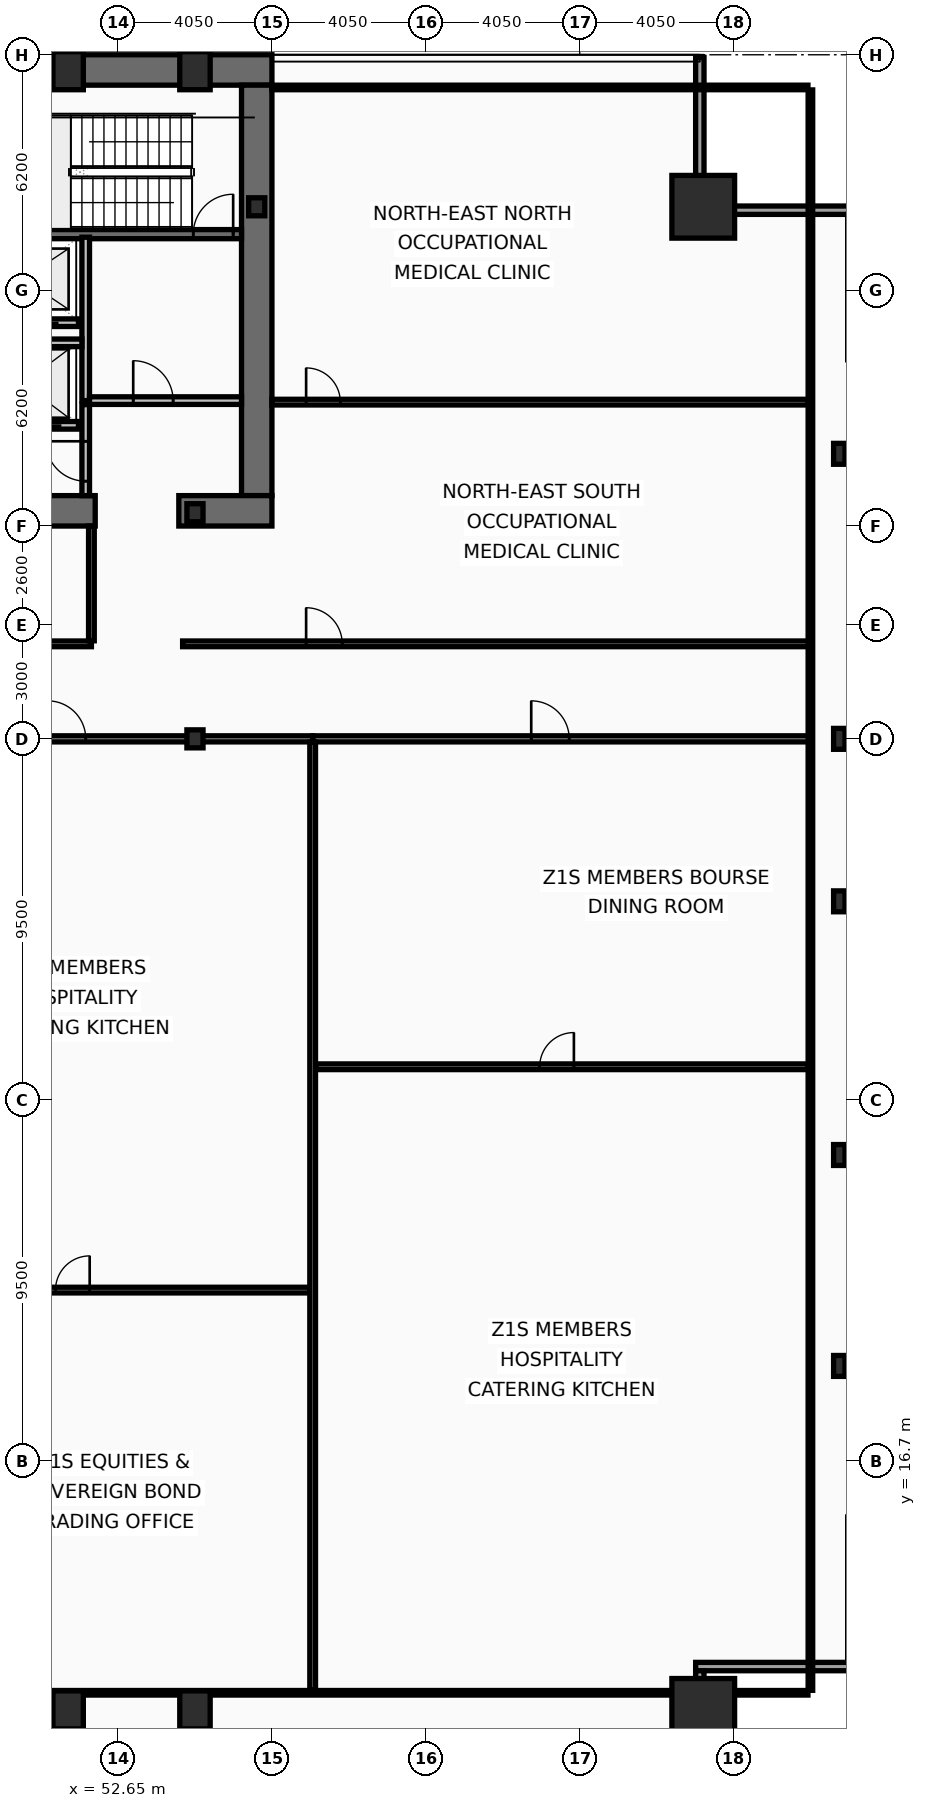
"""IFC4 building model, lengths in metres.
Left out: names, types, materials, properties, quantities, classifications, styles, units other than length and angle.
Written with IfcOpenShell. Run it as: python <this file> out.ifc"""

import sys

from ifc_helpers import new_model, si_unit, direction, frame, frame_2d, origin, origin_2d, place, context, subcontext, project, spatial, rectangle, hollow_rectangle, i_section, extrude, element, fill, save


model = new_model("IFC4")
c1 = context("Model", 3, precision=1e-05, world=origin(), true_north=direction((0.0, 1.0)))
c2 = subcontext(c1, "Body", "Model", "MODEL_VIEW")
j1 = project(units=[si_unit("LENGTHUNIT", "METRE"), si_unit("PLANEANGLEUNIT", "RADIAN")], contexts=[c1])
p1 = place(None, origin())
s1 = spatial("IfcSite", under=j1, at=p1, CompositionType="ELEMENT")
p2 = place(p1, origin())
s2 = spatial("IfcBuilding", under=s1, at=p2, CompositionType="ELEMENT")
p3 = place(p2, frame((0.0, 0.0, 37.8)))
s3 = spatial("IfcBuildingStorey", under=s2, at=p3, CompositionType="ELEMENT", Elevation=37.8)
p4 = place(p3, frame((16.2, 53.3, 0.0), z_axis=(0.0, 0.0, 1.0), x_axis=(1.0, 0.0, 0.0)))
e1 = element("IfcWall", 1, at=p4, inside=s3, PredefinedType="SHEAR", context=c2, shape_type="SweptSolid", body=[
    extrude(rectangle(XDim=40.5, YDim=0.8, at=frame_2d((20.25, 0.0))), origin(), (0.0, 0.0, 1.0), 3.82),
])
p5 = place(p3, frame((56.3, 52.9, 0.0), z_axis=(0.0, 0.0, 1.0), x_axis=(0.0, -1.0, 0.0)))
e2 = element("IfcWall", 2, at=p5, inside=s3, PredefinedType="SHEAR", context=c2, shape_type="SweptSolid", body=[
    extrude(rectangle(XDim=10.8, YDim=0.8, at=frame_2d((5.4, 0.0))), origin(), (0.0, 0.0, 1.0), 3.82),
])
p6 = place(p3, frame((52.05, 41.7, 0.0), z_axis=(0.0, 0.0, 1.0), x_axis=(-1.0, 0.0, 0.0)))
e3 = element("IfcWall", 3, at=p6, inside=s3, PredefinedType="SHEAR", context=c2, shape_type="SweptSolid", body=[
    extrude(rectangle(XDim=11.3, YDim=0.8, at=frame_2d((5.65, 0.0))), origin(), (0.0, 0.0, 1.0), 3.82),
])
p7 = place(p3, frame((56.7, 41.7, 0.0), z_axis=(0.0, 0.0, 1.0), x_axis=(-1.0, 0.0, 0.0)))
e4 = element("IfcWall", 4, at=p7, inside=s3, PredefinedType="SHEAR", context=c2, shape_type="SweptSolid", body=[
    extrude(rectangle(XDim=2.45, YDim=0.8, at=frame_2d((1.225, 0.0))), origin(), (0.0, 0.0, 1.0), 3.82),
])
p8 = place(p3, frame((48.63, 48.98, 0.0), z_axis=(0.0, 0.0, 1.0), x_axis=(1.0, 0.0, 0.0)))
e5 = element("IfcWall", 5, at=p8, inside=s3, PredefinedType="SHEAR", context=c2, shape_type="SweptSolid", body=[
    extrude(rectangle(XDim=7.27, YDim=0.24, at=frame_2d((3.635, 0.0))), origin(), (0.0, 0.0, 1.0), 3.82),
])
p9 = place(p8, frame((6.0, 0.0, 0.0)))
e6 = element("IfcOpeningElement", 6, at=p9, cuts=e5, PredefinedType="OPENING", context=c2, shape_type="SweptSolid", body=[
    extrude(rectangle(XDim=1.05, YDim=2.15, at=frame_2d((0.525, 1.075))), frame((0.0, 0.13, 0.0), z_axis=(0.0, -1.0, 0.0), x_axis=(1.0, 0.0, 0.0)), (0.0, 0.0, 1.0), 0.26),
])
for number, where, z_axis, x_axis in (
    (7, (68.05, 10.15, 0.0), (0.0, 0.0, 1.0), (1.0, 0.0, 0.0)),
    (8, (68.05, 49.7, 0.0), (0.0, 0.0, 1.0), (1.0, 0.0, 0.0)),
):
    element("IfcColumn", number, at=place(p3, frame(where, z_axis=z_axis, x_axis=x_axis)), inside=s3, PredefinedType="COLUMN", context=c2, shape_type="SweptSolid", body=[
        extrude(hollow_rectangle(XDim=1.65, YDim=1.65, WallThickness=0.075, at=origin_2d()), origin(), (0.0, 0.0, 1.0), 4.0),
    ])
for number, where, z_axis, x_axis in (
    (9, (51.337, 10.15, 0.0), (0.0, 0.0, 1.0), (1.0, 0.0, 0.0)),
    (10, (54.675, 10.15, 0.0), (0.0, 0.0, 1.0), (1.0, 0.0, 0.0)),
    (11, (51.337, 53.28, 0.0), (0.0, 0.0, 1.0), (1.0, 0.0, 0.0)),
    (12, (54.675, 53.28, 0.0), (0.0, 0.0, 1.0), (1.0, 0.0, 0.0)),
):
    element("IfcColumn", number, at=place(p3, frame(where, z_axis=z_axis, x_axis=x_axis)), inside=s3, PredefinedType="COLUMN", context=c2, shape_type="SweptSolid", body=[
        extrude(hollow_rectangle(XDim=0.8, YDim=1.0, WallThickness=0.055, at=origin_2d()), origin(), (0.0, 0.0, 1.0), 4.0),
    ])
for number, where, z_axis, x_axis in (
    (13, (71.63, 19.2, 0.0), (0.0, 0.0, 1.0), (1.0, 0.0, 0.0)),
    (14, (71.63, 24.75, 0.0), (0.0, 0.0, 1.0), (1.0, 0.0, 0.0)),
    (15, (71.63, 31.425, 0.0), (0.0, 0.0, 1.0), (1.0, 0.0, 0.0)),
    (16, (71.63, 35.7, 0.0), (0.0, 0.0, 1.0), (1.0, 0.0, 0.0)),
    (17, (71.63, 43.2, 0.0), (0.0, 0.0, 1.0), (1.0, 0.0, 0.0)),
):
    element("IfcColumn", number, at=place(p3, frame(where, z_axis=z_axis, x_axis=x_axis)), inside=s3, PredefinedType="COLUMN", context=c2, shape_type="SweptSolid", body=[
        extrude(i_section(OverallWidth=0.3, OverallDepth=0.55, WebThickness=0.015, FlangeThickness=0.029, at=origin_2d()), origin(), (0.0, 0.0, 1.0), 4.0),
    ])
for number, where, z_axis, x_axis in (
    (18, (56.3, 49.7, 0.0), (0.0, 0.0, 1.0), (1.0, 0.0, 0.0)),
    (19, (54.675, 35.7, 0.0), (0.0, 0.0, 1.0), (1.0, 0.0, 0.0)),
    (20, (54.675, 41.65, 0.0), (0.0, 0.0, 1.0), (1.0, 0.0, 0.0)),
):
    element("IfcColumn", number, at=place(p3, frame(where, z_axis=z_axis, x_axis=x_axis)), inside=s3, PredefinedType="COLUMN", context=c2, shape_type="SweptSolid", body=[
        extrude(i_section(OverallWidth=0.424, OverallDepth=0.474, WebThickness=0.048, FlangeThickness=0.077, at=origin_2d()), origin(), (0.0, 0.0, 1.0), 4.0),
    ])
p10 = place(p3, frame((67.96, 53.63, 0.0), z_axis=(0.0, 0.0, 1.0), x_axis=(0.0, -1.0, 0.0)))
e21 = element("IfcWall", 21, at=p10, inside=s3, PredefinedType="SOLIDWALL", context=c2, shape_type="SweptSolid", body=[
    extrude(rectangle(XDim=3.91, YDim=0.22, at=frame_2d((1.955, 0.0))), origin(), (0.0, 0.0, 1.0), 3.16),
])
for number, where, z_axis, x_axis in (
    (22, (67.85, 49.61, 0.0), (0.0, 0.0, 1.0), (1.0, 0.0, 0.0)),
    (23, (72.07, 11.29, 0.0), (0.0, 0.0, 1.0), (-1.0, 0.0, 0.0)),
):
    element("IfcWall", number, at=place(p3, frame(where, z_axis=z_axis, x_axis=x_axis)), inside=s3, PredefinedType="SOLIDWALL", context=c2, shape_type="SweptSolid", body=[
        extrude(rectangle(XDim=4.22, YDim=0.22, at=frame_2d((2.11, 0.0))), origin(), (0.0, 0.0, 1.0), 3.16),
    ])
p11 = place(p3, frame((67.96, 11.18, 0.0), z_axis=(0.0, 0.0, 1.0), x_axis=(0.0, -1.0, 0.0)))
e24 = element("IfcWall", 24, at=p11, inside=s3, PredefinedType="SOLIDWALL", context=c2, shape_type="SweptSolid", body=[
    extrude(rectangle(XDim=3.91, YDim=0.22, at=frame_2d((1.955, 0.0))), origin(), (0.0, 0.0, 1.0), 3.16),
])
p12 = place(p3, frame((51.61, 43.95, 0.0), z_axis=(0.0, 0.0, 1.0), x_axis=(-1.0, 0.0, 0.0)))
e25 = element("IfcWall", 25, at=p12, inside=s3, PredefinedType="PARTITIONING", context=c2, shape_type="SweptSolid", body=[
    extrude(rectangle(XDim=2.92, YDim=0.2, at=frame_2d((1.46, 0.0))), origin(), (0.0, 0.0, 1.0), 3.82),
])
p13 = place(p12, frame((0.81, 0.0, 0.0)))
e26 = element("IfcOpeningElement", 26, at=p13, cuts=e25, PredefinedType="OPENING", context=c2, shape_type="SweptSolid", body=[
    extrude(rectangle(XDim=1.3, YDim=2.18, at=frame_2d((0.65, 1.09))), frame((0.0, 0.11, 0.0), z_axis=(0.0, -1.0, 0.0), x_axis=(1.0, 0.0, 0.0)), (0.0, 0.0, 1.0), 0.22),
])
p14 = place(p3, frame((51.61, 46.65, 0.0), z_axis=(0.0, 0.0, 1.0), x_axis=(-1.0, 0.0, 0.0)))
e27 = element("IfcWall", 27, at=p14, inside=s3, PredefinedType="PARTITIONING", context=c2, shape_type="SweptSolid", body=[
    extrude(rectangle(XDim=2.92, YDim=0.2, at=frame_2d((1.46, 0.0))), origin(), (0.0, 0.0, 1.0), 3.82),
])
p15 = place(p14, frame((0.86, 0.0, 0.0)))
e28 = element("IfcOpeningElement", 28, at=p15, cuts=e27, PredefinedType="OPENING", context=c2, shape_type="SweptSolid", body=[
    extrude(rectangle(XDim=1.2, YDim=2.18, at=frame_2d((0.6, 1.09))), frame((0.0, 0.11, 0.0), z_axis=(0.0, -1.0, 0.0), x_axis=(1.0, 0.0, 0.0)), (0.0, 0.0, 1.0), 0.22),
])
p16 = place(p3, frame((51.8, 44.6, 0.0), z_axis=(0.0, 0.0, 1.0), x_axis=(0.0, 1.0, 0.0)))
e29 = element("IfcWall", 29, at=p16, inside=s3, PredefinedType="PARTITIONING", context=c2, shape_type="SweptSolid", body=[
    extrude(rectangle(XDim=4.3, YDim=0.2, at=frame_2d((2.15, 0.0))), origin(), (0.0, 0.0, 1.0), 3.82),
])
p17 = place(p3, frame((51.9, 44.6, 0.0), z_axis=(0.0, 0.0, 1.0), x_axis=(1.0, 0.0, 0.0)))
e30 = element("IfcWall", 30, at=p17, inside=s3, PredefinedType="PARTITIONING", context=c2, shape_type="SweptSolid", body=[
    extrude(rectangle(XDim=4.0, YDim=0.2, at=frame_2d((2.0, 0.0))), origin(), (0.0, 0.0, 1.0), 3.82),
])
p18 = place(p17, frame((1.15, 0.0, 0.0)))
e31 = element("IfcOpeningElement", 31, at=p18, cuts=e30, PredefinedType="OPENING", context=c2, shape_type="SweptSolid", body=[
    extrude(rectangle(XDim=1.05, YDim=2.15, at=frame_2d((0.525, 1.075))), frame((0.0, 0.11, 0.0), z_axis=(0.0, -1.0, 0.0), x_axis=(1.0, 0.0, 0.0)), (0.0, 0.0, 1.0), 0.22),
])
p19 = place(p3, frame((48.63, 46.12, 0.0), z_axis=(0.0, 0.0, 1.0), x_axis=(1.0, 0.0, 0.0)))
e32 = element("IfcWall", 32, at=p19, inside=s3, PredefinedType="PARTITIONING", context=c2, shape_type="SweptSolid", body=[
    extrude(rectangle(XDim=3.07, YDim=0.2, at=frame_2d((1.535, 0.0))), origin(), (0.0, 0.0, 1.0), 3.82),
])
p20 = place(p3, frame((51.8, 42.1, 0.0), z_axis=(0.0, 0.0, 1.0), x_axis=(0.0, 1.0, 0.0)))
e33 = element("IfcWall", 33, at=p20, inside=s3, PredefinedType="PARTITIONING", context=c2, shape_type="SweptSolid", body=[
    extrude(rectangle(XDim=2.395, YDim=0.2, at=frame_2d((1.198, 0.0))), origin(), (0.0, 0.0, 1.0), 3.82),
])
p21 = place(p20, frame((0.38, 0.0, 0.0)))
e34 = element("IfcOpeningElement", 34, at=p21, cuts=e33, PredefinedType="OPENING", context=c2, shape_type="SweptSolid", body=[
    extrude(rectangle(XDim=1.05, YDim=2.15, at=frame_2d((0.525, 1.075))), frame((0.0, 0.11, 0.0), z_axis=(0.0, -1.0, 0.0), x_axis=(1.0, 0.0, 0.0)), (0.0, 0.0, 1.0), 0.22),
])
p22 = place(p3, frame((45.55, 38.2, 0.0), z_axis=(0.0, 0.0, 1.0), x_axis=(1.0, 0.0, 0.0)))
e35 = element("IfcWall", 35, at=p22, inside=s3, PredefinedType="PARTITIONING", context=c2, shape_type="SweptSolid", body=[
    extrude(rectangle(XDim=6.4, YDim=0.15, at=frame_2d((3.2, 0.0))), origin(), (0.0, 0.0, 1.0), 3.01),
])
p23 = place(p22, frame((1.1, 0.0, 0.0)))
e36 = element("IfcOpeningElement", 36, at=p23, cuts=e35, PredefinedType="OPENING", context=c2, shape_type="SweptSolid", body=[
    extrude(rectangle(XDim=1.0, YDim=2.05, at=frame_2d((0.5, 1.025))), frame((0.0, 0.085, 0.0), z_axis=(0.0, -1.0, 0.0), x_axis=(1.0, 0.0, 0.0)), (0.0, 0.0, 1.0), 0.17),
])
p24 = place(p3, frame((51.95, 38.28, 0.0), z_axis=(0.0, 0.0, 1.0), x_axis=(0.0, 1.0, 0.0)))
e37 = element("IfcWall", 37, at=p24, inside=s3, PredefinedType="PARTITIONING", context=c2, shape_type="SweptSolid", body=[
    extrude(rectangle(XDim=3.02, YDim=0.15, at=frame_2d((1.51, 0.0))), origin(), (0.0, 0.0, 1.0), 3.82),
])
p25 = place(p3, frame((54.35, 38.2, 0.0), z_axis=(0.0, 0.0, 1.0), x_axis=(1.0, 0.0, 0.0)))
e38 = element("IfcWall", 38, at=p25, inside=s3, PredefinedType="PARTITIONING", context=c2, shape_type="SweptSolid", body=[
    extrude(rectangle(XDim=16.52, YDim=0.15, at=frame_2d((8.26, 0.0))), origin(), (0.0, 0.0, 1.0), 3.01),
])
p26 = place(p25, frame((3.25, 0.0, 0.0)))
e39 = element("IfcOpeningElement", 39, at=p26, cuts=e38, PredefinedType="OPENING", context=c2, shape_type="SweptSolid", body=[
    extrude(rectangle(XDim=0.95, YDim=2.05, at=frame_2d((0.475, 1.025))), frame((0.0, 0.085, 0.0), z_axis=(0.0, -1.0, 0.0), x_axis=(1.0, 0.0, 0.0)), (0.0, 0.0, 1.0), 0.17),
])
p27 = place(p3, frame((56.7, 44.56, 0.0), z_axis=(0.0, 0.0, 1.0), x_axis=(1.0, 0.0, 0.0)))
e40 = element("IfcWall", 40, at=p27, inside=s3, PredefinedType="PARTITIONING", context=c2, shape_type="SweptSolid", body=[
    extrude(rectangle(XDim=14.105, YDim=0.15, at=frame_2d((7.052, 0.0))), origin(), (0.0, 0.0, 1.0), 3.16),
])
p28 = place(p27, frame((0.9, 0.0, 0.0)))
e41 = element("IfcOpeningElement", 41, at=p28, cuts=e40, PredefinedType="OPENING", context=c2, shape_type="SweptSolid", body=[
    extrude(rectangle(XDim=0.9, YDim=2.05, at=frame_2d((0.45, 1.025))), frame((0.0, 0.085, 0.0), z_axis=(0.0, -1.0, 0.0), x_axis=(1.0, 0.0, 0.0)), (0.0, 0.0, 1.0), 0.17),
])
p29 = place(p3, frame((45.322, 35.7, 0.0), z_axis=(0.0, 0.0, 1.0), x_axis=(1.0, 0.0, 0.0)))
e42 = element("IfcWall", 42, at=p29, inside=s3, PredefinedType="PARTITIONING", context=c2, shape_type="SweptSolid", body=[
    extrude(rectangle(XDim=12.45, YDim=0.16, at=frame_2d((6.225, 0.0))), origin(), (0.0, 0.0, 1.0), 3.01),
])
p30 = place(p29, frame((5.479, 0.0, 0.0)))
e43 = element("IfcOpeningElement", 43, at=p30, cuts=e42, PredefinedType="OPENING", context=c2, shape_type="SweptSolid", body=[
    extrude(rectangle(XDim=1.0, YDim=2.05, at=frame_2d((0.5, 1.025))), frame((0.0, 0.09, 0.0), z_axis=(0.0, -1.0, 0.0), x_axis=(1.0, 0.0, 0.0)), (0.0, 0.0, 1.0), 0.18),
])
p31 = place(p3, frame((45.402, 21.196, 0.0), z_axis=(0.0, 0.0, 1.0), x_axis=(1.0, 0.0, 0.0)))
e44 = element("IfcWall", 44, at=p31, inside=s3, PredefinedType="PARTITIONING", context=c2, shape_type="SweptSolid", body=[
    extrude(rectangle(XDim=12.29, YDim=0.15, at=frame_2d((6.145, 0.0))), origin(), (0.0, 0.0, 1.0), 3.01),
])
p32 = place(p31, frame((5.603, 0.0, 0.0)))
e45 = element("IfcOpeningElement", 45, at=p32, cuts=e44, PredefinedType="OPENING", context=c2, shape_type="SweptSolid", body=[
    extrude(rectangle(XDim=0.9, YDim=2.05, at=frame_2d((0.45, 1.025))), frame((0.0, 0.085, 0.0), z_axis=(0.0, -1.0, 0.0), x_axis=(1.0, 0.0, 0.0)), (0.0, 0.0, 1.0), 0.17),
])
p33 = place(p3, frame((57.772, 35.7, 0.0), z_axis=(0.0, 0.0, 1.0), x_axis=(1.0, 0.0, 0.0)))
e46 = element("IfcWall", 46, at=p33, inside=s3, PredefinedType="PARTITIONING", context=c2, shape_type="SweptSolid", body=[
    extrude(rectangle(XDim=13.098, YDim=0.16, at=frame_2d((6.549, 0.0))), origin(), (0.0, 0.0, 1.0), 3.01),
])
p34 = place(p33, frame((5.751, 0.0, 0.0)))
e47 = element("IfcOpeningElement", 47, at=p34, cuts=e46, PredefinedType="OPENING", context=c2, shape_type="SweptSolid", body=[
    extrude(rectangle(XDim=1.0, YDim=2.05, at=frame_2d((0.5, 1.025))), frame((0.0, 0.09, 0.0), z_axis=(0.0, -1.0, 0.0), x_axis=(1.0, 0.0, 0.0)), (0.0, 0.0, 1.0), 0.18),
])
p35 = place(p3, frame((57.772, 10.665, 0.0), z_axis=(0.0, 0.0, 1.0), x_axis=(0.0, 1.0, 0.0)))
e48 = element("IfcWall", 48, at=p35, inside=s3, PredefinedType="PARTITIONING", context=c2, shape_type="SweptSolid", body=[
    extrude(rectangle(XDim=24.95, YDim=0.15, at=frame_2d((12.475, 0.0))), origin(), (0.0, 0.0, 1.0), 3.01),
])
p36 = place(p3, frame((57.852, 27.072, 0.0), z_axis=(0.0, 0.0, 1.0), x_axis=(1.0, 0.0, 0.0)))
e49 = element("IfcWall", 49, at=p36, inside=s3, PredefinedType="PARTITIONING", context=c2, shape_type="SweptSolid", body=[
    extrude(rectangle(XDim=12.953, YDim=0.15, at=frame_2d((6.477, 0.0))), origin(), (0.0, 0.0, 1.0), 3.82),
])
p37 = place(p36, frame((5.894, 0.0, 0.0)))
e50 = element("IfcOpeningElement", 50, at=p37, cuts=e49, PredefinedType="OPENING", context=c2, shape_type="SweptSolid", body=[
    extrude(rectangle(XDim=0.9, YDim=2.05, at=frame_2d((0.45, 1.025))), frame((0.0, 0.085, 0.0), z_axis=(0.0, -1.0, 0.0), x_axis=(1.0, 0.0, 0.0)), (0.0, 0.0, 1.0), 0.17),
])
p38 = place(p3, frame((70.87, 10.665, 0.0), z_axis=(0.0, 0.0, 1.0), x_axis=(0.0, 1.0, 0.0)))
e51 = element("IfcWall", 51, at=p38, inside=s3, PredefinedType="PARTITIONING", context=c2, shape_type="SweptSolid", body=[
    extrude(rectangle(XDim=42.11, YDim=0.12, at=frame_2d((21.055, 0.0))), origin(), (0.0, 0.0, 1.0), 3.01),
])
p39 = place(p3, frame((56.7, 52.84, 0.0), z_axis=(0.0, 0.0, 1.0), x_axis=(1.0, 0.0, 0.0)))
e52 = element("IfcWall", 52, at=p39, inside=s3, PredefinedType="PARTITIONING", context=c2, shape_type="SweptSolid", body=[
    extrude(rectangle(XDim=14.105, YDim=0.12, at=frame_2d((7.052, 0.0))), origin(), (0.0, 0.0, 1.0), 3.82),
])
p40 = place(p3, frame((2.095, 10.6, 0.0), z_axis=(0.0, 0.0, 1.0), x_axis=(1.0, 0.0, 0.0)))
e53 = element("IfcWall", 53, at=p40, inside=s3, PredefinedType="PARTITIONING", context=c2, shape_type="SweptSolid", body=[
    extrude(rectangle(XDim=68.71, YDim=0.12, at=frame_2d((34.355, 0.0))), origin(), (0.0, 0.0, 1.0), 3.01),
])
p41 = place(p9, origin())
e54 = element("IfcDoor", 54, at=p41, inside=s3, OperationType="SINGLE_SWING_RIGHT", PredefinedType="DOOR", context=c2, shape_type="SweptSolid", body=[
    extrude(rectangle(XDim=1.05, YDim=2.15, at=frame_2d((0.525, 1.075))), frame((0.0, 0.025, 0.0), z_axis=(0.0, -1.0, 0.0), x_axis=(1.0, 0.0, 0.0)), (0.0, 0.0, 1.0), 0.05),
])
fill(e6, e54)
p42 = place(p18, origin())
e55 = element("IfcDoor", 55, at=p42, inside=s3, OperationType="SINGLE_SWING_LEFT", PredefinedType="DOOR", context=c2, shape_type="SweptSolid", body=[
    extrude(rectangle(XDim=1.05, YDim=2.15, at=frame_2d((0.525, 1.075))), frame((0.0, 0.025, 0.0), z_axis=(0.0, -1.0, 0.0), x_axis=(1.0, 0.0, 0.0)), (0.0, 0.0, 1.0), 0.05),
])
fill(e31, e55)
p43 = place(p21, origin())
e56 = element("IfcDoor", 56, at=p43, inside=s3, OperationType="SINGLE_SWING_RIGHT", PredefinedType="DOOR", context=c2, shape_type="SweptSolid", body=[
    extrude(rectangle(XDim=1.05, YDim=2.15, at=frame_2d((0.525, 1.075))), frame((0.0, 0.025, 0.0), z_axis=(0.0, -1.0, 0.0), x_axis=(1.0, 0.0, 0.0)), (0.0, 0.0, 1.0), 0.05),
])
fill(e34, e56)
p44 = place(p26, origin())
e57 = element("IfcDoor", 57, at=p44, inside=s3, OperationType="SINGLE_SWING_LEFT", PredefinedType="DOOR", context=c2, shape_type="SweptSolid", body=[
    extrude(rectangle(XDim=0.95, YDim=2.05, at=frame_2d((0.475, 1.025))), frame((0.0, 0.025, 0.0), z_axis=(0.0, -1.0, 0.0), x_axis=(1.0, 0.0, 0.0)), (0.0, 0.0, 1.0), 0.05),
])
fill(e39, e57)
p45 = place(p28, origin())
e58 = element("IfcDoor", 58, at=p45, inside=s3, OperationType="SINGLE_SWING_LEFT", PredefinedType="DOOR", context=c2, shape_type="SweptSolid", body=[
    extrude(rectangle(XDim=0.9, YDim=2.05, at=frame_2d((0.45, 1.025))), frame((0.0, 0.025, 0.0), z_axis=(0.0, -1.0, 0.0), x_axis=(1.0, 0.0, 0.0)), (0.0, 0.0, 1.0), 0.05),
])
fill(e41, e58)
p46 = place(p30, origin())
e59 = element("IfcDoor", 59, at=p46, inside=s3, OperationType="SINGLE_SWING_LEFT", PredefinedType="DOOR", context=c2, shape_type="SweptSolid", body=[
    extrude(rectangle(XDim=1.0, YDim=2.05, at=frame_2d((0.5, 1.025))), frame((0.0, 0.025, 0.0), z_axis=(0.0, -1.0, 0.0), x_axis=(1.0, 0.0, 0.0)), (0.0, 0.0, 1.0), 0.05),
])
fill(e43, e59)
p47 = place(p32, origin())
e60 = element("IfcDoor", 60, at=p47, inside=s3, OperationType="SINGLE_SWING_RIGHT", PredefinedType="DOOR", context=c2, shape_type="SweptSolid", body=[
    extrude(rectangle(XDim=0.9, YDim=2.05, at=frame_2d((0.45, 1.025))), frame((0.0, 0.025, 0.0), z_axis=(0.0, -1.0, 0.0), x_axis=(1.0, 0.0, 0.0)), (0.0, 0.0, 1.0), 0.05),
])
fill(e45, e60)
p48 = place(p34, origin())
e61 = element("IfcDoor", 61, at=p48, inside=s3, OperationType="SINGLE_SWING_LEFT", PredefinedType="DOOR", context=c2, shape_type="SweptSolid", body=[
    extrude(rectangle(XDim=1.0, YDim=2.05, at=frame_2d((0.5, 1.025))), frame((0.0, 0.025, 0.0), z_axis=(0.0, -1.0, 0.0), x_axis=(1.0, 0.0, 0.0)), (0.0, 0.0, 1.0), 0.05),
])
fill(e47, e61)
p49 = place(p37, origin())
e62 = element("IfcDoor", 62, at=p49, inside=s3, OperationType="SINGLE_SWING_RIGHT", PredefinedType="DOOR", context=c2, shape_type="SweptSolid", body=[
    extrude(rectangle(XDim=0.9, YDim=2.05, at=frame_2d((0.45, 1.025))), frame((0.0, 0.025, 0.0), z_axis=(0.0, -1.0, 0.0), x_axis=(1.0, 0.0, 0.0)), (0.0, 0.0, 1.0), 0.05),
])
fill(e50, e62)
save(model, sys.argv[1])
